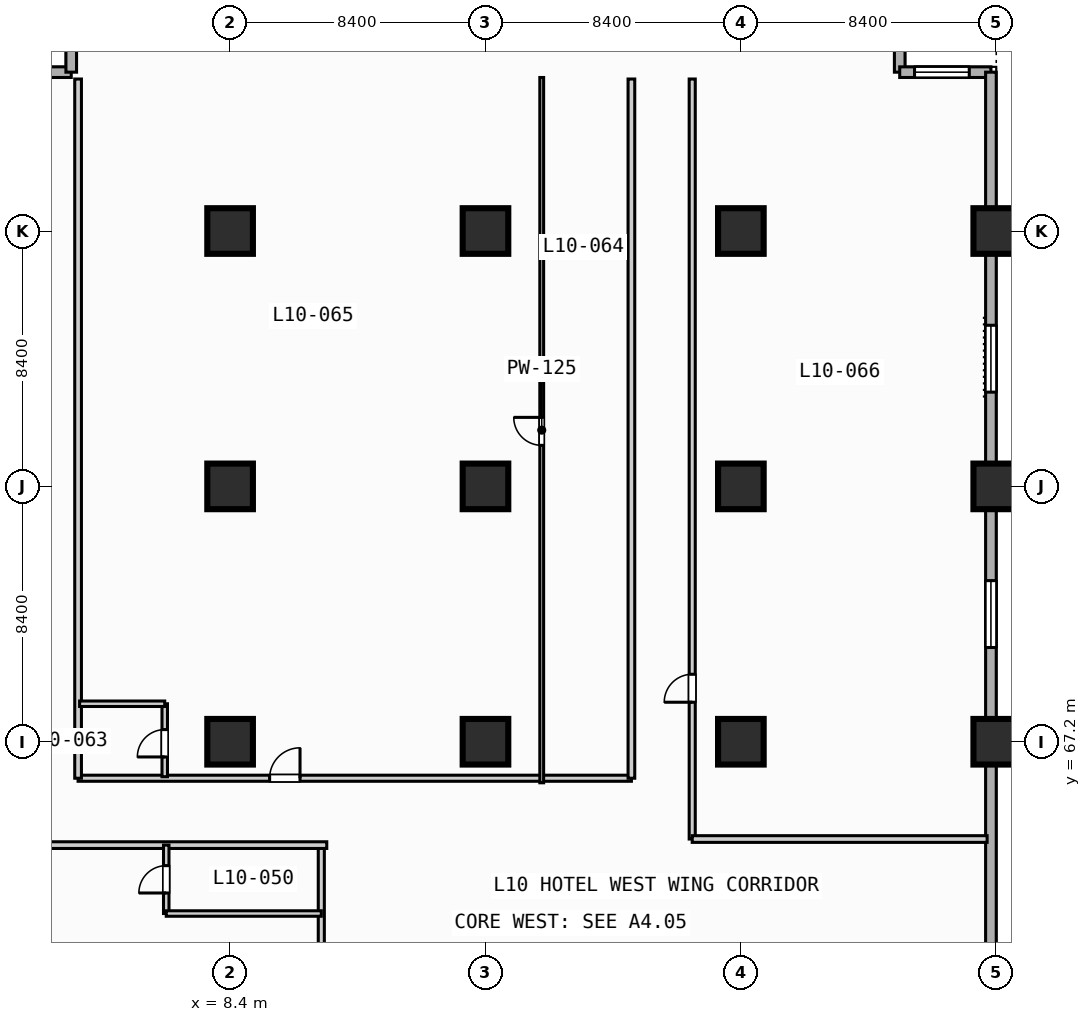
"""IFC4 building model, lengths in metres.
Left out: names, types, materials, properties, quantities, classifications, styles, units other than length and angle.
Written with IfcOpenShell. Run it as: python <this file> out.ifc"""

import sys

from ifc_helpers import new_model, si_unit, direction, frame, frame_2d, origin, origin_2d, place, context, subcontext, project, spatial, rectangle, extrude, element, fill, save


model = new_model("IFC4")
c1 = context("Model", 3, precision=1e-05, world=origin(), true_north=direction((0.0, 1.0)))
c2 = subcontext(c1, "Body", "Model", "MODEL_VIEW")
j1 = project(units=[si_unit("LENGTHUNIT", "METRE"), si_unit("PLANEANGLEUNIT", "RADIAN")], contexts=[c1])
p1 = place(None, origin())
s1 = spatial("IfcSite", under=j1, at=p1, CompositionType="ELEMENT")
p2 = place(p1, origin())
s2 = spatial("IfcBuilding", under=s1, at=p2, CompositionType="ELEMENT")
p3 = place(p2, frame((0.0, 0.0, 47.2)))
s3 = spatial("IfcBuildingStorey", under=s2, at=p3, CompositionType="ELEMENT", Elevation=47.2)
for number, where, z_axis, x_axis in (
    (1, (8.4, 67.2, 0.0), (0.0, 0.0, 1.0), (1.0, 0.0, 0.0)),
    (2, (8.4, 75.6, 0.0), (0.0, 0.0, 1.0), (1.0, 0.0, 0.0)),
    (3, (8.4, 84.0, 0.0), (0.0, 0.0, 1.0), (1.0, 0.0, 0.0)),
    (4, (16.8, 67.2, 0.0), (0.0, 0.0, 1.0), (1.0, 0.0, 0.0)),
    (5, (16.8, 75.6, 0.0), (0.0, 0.0, 1.0), (1.0, 0.0, 0.0)),
    (6, (16.8, 84.0, 0.0), (0.0, 0.0, 1.0), (1.0, 0.0, 0.0)),
    (7, (25.2, 67.2, 0.0), (0.0, 0.0, 1.0), (1.0, 0.0, 0.0)),
    (8, (25.2, 75.6, 0.0), (0.0, 0.0, 1.0), (1.0, 0.0, 0.0)),
    (9, (25.2, 84.0, 0.0), (0.0, 0.0, 1.0), (1.0, 0.0, 0.0)),
    (10, (33.6, 67.2, 0.0), (0.0, 0.0, 1.0), (1.0, 0.0, 0.0)),
    (11, (33.6, 75.6, 0.0), (0.0, 0.0, 1.0), (1.0, 0.0, 0.0)),
    (12, (33.6, 84.0, 0.0), (0.0, 0.0, 1.0), (1.0, 0.0, 0.0)),
):
    element("IfcColumn", number, at=place(p3, frame(where, z_axis=z_axis, x_axis=x_axis)), inside=s3, PredefinedType="COLUMN", context=c2, shape_type="SweptSolid", body=[
        extrude(rectangle(XDim=1.5, YDim=1.5, at=origin_2d()), origin(), (0.0, 0.0, 1.0), 3.8),
    ])
for number, where, z_axis, x_axis in (
    (13, (0.175, 89.225, 0.0), (0.0, 0.0, 1.0), (1.0, 0.0, 0.0)),
    (14, (3.175, 89.225, 0.0), (0.0, 0.0, 1.0), (0.0, 1.0, 0.0)),
    (15, (30.425, 92.225, 0.0), (0.0, 0.0, 1.0), (0.0, -1.0, 0.0)),
):
    element("IfcWall", number, at=place(p3, frame(where, z_axis=z_axis, x_axis=x_axis)), inside=s3, PredefinedType="STANDARD", context=c2, shape_type="SweptSolid", body=[
        extrude(rectangle(XDim=3.0, YDim=0.35, at=frame_2d((1.5, 0.0))), origin(), (0.0, 0.0, 1.0), 3.55),
    ])
p4 = place(p3, frame((30.425, 89.225, 0.0), z_axis=(0.0, 0.0, 1.0), x_axis=(1.0, 0.0, 0.0)))
e16 = element("IfcWall", 16, at=p4, inside=s3, PredefinedType="STANDARD", context=c2, shape_type="SweptSolid", body=[
    extrude(rectangle(XDim=3.0, YDim=0.35, at=frame_2d((1.5, 0.0))), origin(), (0.0, 0.0, 1.0), 3.55),
])
p5 = place(p4, frame((0.488, 0.0, 0.85)))
e17 = element("IfcOpeningElement", 17, at=p5, cuts=e16, PredefinedType="OPENING", context=c2, shape_type="SweptSolid", body=[
    extrude(rectangle(XDim=1.8, YDim=1.8, at=frame_2d((0.9, 0.9))), frame((0.0, 0.185, 0.0), z_axis=(0.0, -1.0, 0.0), x_axis=(1.0, 0.0, 0.0)), (0.0, 0.0, 1.0), 0.37),
])
p6 = place(p3, frame((33.425, 89.225, 0.0), z_axis=(0.0, 0.0, 1.0), x_axis=(0.0, -1.0, 0.0)))
e18 = element("IfcWall", 18, at=p6, inside=s3, PredefinedType="STANDARD", context=c2, shape_type="SweptSolid", body=[
    extrude(rectangle(XDim=55.8, YDim=0.35, at=frame_2d((27.9, 0.0))), origin(), (0.0, 0.0, 1.0), 3.55),
])
p7 = place(p6, frame((16.725, 0.0, 0.85)))
e19 = element("IfcOpeningElement", 19, at=p7, cuts=e18, PredefinedType="OPENING", context=c2, shape_type="SweptSolid", body=[
    extrude(rectangle(XDim=2.2, YDim=1.8, at=frame_2d((1.1, 0.9))), frame((0.0, 0.185, 0.0), z_axis=(0.0, -1.0, 0.0), x_axis=(1.0, 0.0, 0.0)), (0.0, 0.0, 1.0), 0.37),
])
p8 = place(p6, frame((8.325, 0.0, 0.85)))
e20 = element("IfcOpeningElement", 20, at=p8, cuts=e18, PredefinedType="OPENING", context=c2, shape_type="SweptSolid", body=[
    extrude(rectangle(XDim=2.2, YDim=1.8, at=frame_2d((1.1, 0.9))), frame((0.0, 0.185, 0.0), z_axis=(0.0, -1.0, 0.0), x_axis=(1.0, 0.0, 0.0)), (0.0, 0.0, 1.0), 0.37),
])
p9 = place(p3, frame((11.4, 3.4, 0.0), z_axis=(0.0, 0.0, 1.0), x_axis=(0.0, 1.0, 0.0)))
e21 = element("IfcWall", 21, at=p9, inside=s3, PredefinedType="PARTITIONING", context=c2, shape_type="SweptSolid", body=[
    extrude(rectangle(XDim=60.4, YDim=0.2, at=frame_2d((30.2, 0.0))), origin(), (0.0, 0.0, 1.0), 3.55),
])
p10 = place(p9, frame((6.065, 0.0, 0.0)))
e22 = element("IfcOpeningElement", 22, at=p10, cuts=e21, PredefinedType="OPENING", context=c2, shape_type="SweptSolid", body=[
    extrude(rectangle(XDim=1.0, YDim=2.15, at=frame_2d((0.5, 1.075))), frame((0.0, 0.11, 0.0), z_axis=(0.0, -1.0, 0.0), x_axis=(1.0, 0.0, 0.0)), (0.0, 0.0, 1.0), 0.22),
])
p11 = place(p9, frame((13.735, 0.0, 0.0)))
e23 = element("IfcOpeningElement", 23, at=p11, cuts=e21, PredefinedType="OPENING", context=c2, shape_type="SweptSolid", body=[
    extrude(rectangle(XDim=1.0, YDim=2.15, at=frame_2d((0.5, 1.075))), frame((0.0, 0.11, 0.0), z_axis=(0.0, -1.0, 0.0), x_axis=(1.0, 0.0, 0.0)), (0.0, 0.0, 1.0), 0.22),
])
p12 = place(p9, frame((22.96, 0.0, 0.0)))
e24 = element("IfcOpeningElement", 24, at=p12, cuts=e21, PredefinedType="OPENING", context=c2, shape_type="SweptSolid", body=[
    extrude(rectangle(XDim=1.0, YDim=2.15, at=frame_2d((0.5, 1.075))), frame((0.0, 0.11, 0.0), z_axis=(0.0, -1.0, 0.0), x_axis=(1.0, 0.0, 0.0)), (0.0, 0.0, 1.0), 0.22),
])
p13 = place(p9, frame((31.785, 0.0, 0.0)))
e25 = element("IfcOpeningElement", 25, at=p13, cuts=e21, PredefinedType="OPENING", context=c2, shape_type="SweptSolid", body=[
    extrude(rectangle(XDim=1.0, YDim=2.15, at=frame_2d((0.5, 1.075))), frame((0.0, 0.11, 0.0), z_axis=(0.0, -1.0, 0.0), x_axis=(1.0, 0.0, 0.0)), (0.0, 0.0, 1.0), 0.22),
])
p14 = place(p9, frame((42.56, 0.0, 0.0)))
e26 = element("IfcOpeningElement", 26, at=p14, cuts=e21, PredefinedType="OPENING", context=c2, shape_type="SweptSolid", body=[
    extrude(rectangle(XDim=1.0, YDim=2.15, at=frame_2d((0.5, 1.075))), frame((0.0, 0.11, 0.0), z_axis=(0.0, -1.0, 0.0), x_axis=(1.0, 0.0, 0.0)), (0.0, 0.0, 1.0), 0.22),
])
p15 = place(p9, frame((53.935, 0.0, 0.0)))
e27 = element("IfcOpeningElement", 27, at=p15, cuts=e21, PredefinedType="OPENING", context=c2, shape_type="SweptSolid", body=[
    extrude(rectangle(XDim=1.0, YDim=2.15, at=frame_2d((0.5, 1.075))), frame((0.0, 0.11, 0.0), z_axis=(0.0, -1.0, 0.0), x_axis=(1.0, 0.0, 0.0)), (0.0, 0.0, 1.0), 0.22),
])
p16 = place(p3, frame((0.2, 63.8, 0.0), z_axis=(0.0, 0.0, 1.0), x_axis=(1.0, 0.0, 0.0)))
e28 = element("IfcWall", 28, at=p16, inside=s3, PredefinedType="PARTITIONING", context=c2, shape_type="SweptSolid", body=[
    extrude(rectangle(XDim=11.38, YDim=0.22, at=frame_2d((5.69, 0.0))), origin(), (0.0, 0.0, 1.0), 3.55),
])
p17 = place(p3, frame((6.3, 61.55, 0.0), z_axis=(0.0, 0.0, 1.0), x_axis=(0.0, 1.0, 0.0)))
e29 = element("IfcWall", 29, at=p17, inside=s3, PredefinedType="PLUMBINGWALL", context=c2, shape_type="SweptSolid", body=[
    extrude(rectangle(XDim=2.25, YDim=0.18, at=frame_2d((1.125, 0.0))), origin(), (0.0, 0.0, 1.0), 3.55),
])
p18 = place(p17, frame((0.675, 0.0, 0.0)))
e30 = element("IfcOpeningElement", 30, at=p18, cuts=e29, PredefinedType="OPENING", context=c2, shape_type="SweptSolid", body=[
    extrude(rectangle(XDim=0.9, YDim=2.1, at=frame_2d((0.45, 1.05))), frame((0.0, 0.1, 0.0), z_axis=(0.0, -1.0, 0.0), x_axis=(1.0, 0.0, 0.0)), (0.0, 0.0, 1.0), 0.2),
])
p19 = place(p3, frame((6.3, 61.55, 0.0), z_axis=(0.0, 0.0, 1.0), x_axis=(1.0, 0.0, 0.0)))
e31 = element("IfcWall", 31, at=p19, inside=s3, PredefinedType="PLUMBINGWALL", context=c2, shape_type="SweptSolid", body=[
    extrude(rectangle(XDim=5.1, YDim=0.18, at=frame_2d((2.55, 0.0))), origin(), (0.0, 0.0, 1.0), 3.55),
])
p20 = place(p3, frame((3.4, 66.0, 0.0), z_axis=(0.0, 0.0, 1.0), x_axis=(1.0, 0.0, 0.0)))
e32 = element("IfcWall", 32, at=p20, inside=s3, PredefinedType="PARTITIONING", context=c2, shape_type="SweptSolid", body=[
    extrude(rectangle(XDim=18.2, YDim=0.2, at=frame_2d((9.1, 0.0))), origin(), (0.0, 0.0, 1.0), 3.55),
])
p21 = place(p20, frame((6.3, 0.0, 0.0)))
e33 = element("IfcOpeningElement", 33, at=p21, cuts=e32, PredefinedType="OPENING", context=c2, shape_type="SweptSolid", body=[
    extrude(rectangle(XDim=1.0, YDim=2.15, at=frame_2d((0.5, 1.075))), frame((0.0, 0.11, 0.0), z_axis=(0.0, -1.0, 0.0), x_axis=(1.0, 0.0, 0.0)), (0.0, 0.0, 1.0), 0.22),
])
for number, where, z_axis, x_axis in (
    (34, (21.6, 66.0, 0.0), (0.0, 0.0, 1.0), (0.0, 1.0, 0.0)),
    (35, (3.4, 66.0, 0.0), (0.0, 0.0, 1.0), (0.0, 1.0, 0.0)),
):
    element("IfcWall", number, at=place(p3, frame(where, z_axis=z_axis, x_axis=x_axis)), inside=s3, PredefinedType="PARTITIONING", context=c2, shape_type="SweptSolid", body=[
        extrude(rectangle(XDim=23.0, YDim=0.22, at=frame_2d((11.5, 0.0))), origin(), (0.0, 0.0, 1.0), 3.55),
    ])
p22 = place(p3, frame((6.25, 66.05, 0.0), z_axis=(0.0, 0.0, 1.0), x_axis=(0.0, 1.0, 0.0)))
e36 = element("IfcWall", 36, at=p22, inside=s3, PredefinedType="PLUMBINGWALL", context=c2, shape_type="SweptSolid", body=[
    extrude(rectangle(XDim=2.4, YDim=0.18, at=frame_2d((1.2, 0.0))), origin(), (0.0, 0.0, 1.0), 3.55),
])
p23 = place(p22, frame((0.65, 0.0, 0.0)))
e37 = element("IfcOpeningElement", 37, at=p23, cuts=e36, PredefinedType="OPENING", context=c2, shape_type="SweptSolid", body=[
    extrude(rectangle(XDim=0.9, YDim=2.1, at=frame_2d((0.45, 1.05))), frame((0.0, 0.1, 0.0), z_axis=(0.0, -1.0, 0.0), x_axis=(1.0, 0.0, 0.0)), (0.0, 0.0, 1.0), 0.2),
])
p24 = place(p3, frame((3.45, 68.45, 0.0), z_axis=(0.0, 0.0, 1.0), x_axis=(1.0, 0.0, 0.0)))
e38 = element("IfcWall", 38, at=p24, inside=s3, PredefinedType="PLUMBINGWALL", context=c2, shape_type="SweptSolid", body=[
    extrude(rectangle(XDim=2.8, YDim=0.18, at=frame_2d((1.4, 0.0))), origin(), (0.0, 0.0, 1.0), 3.55),
])
p25 = place(p3, frame((18.65, 65.85, 0.0), z_axis=(0.0, 0.0, 1.0), x_axis=(0.0, 1.0, 0.0)))
e39 = element("IfcWall", 39, at=p25, inside=s3, PredefinedType="PARTITIONING", context=c2, shape_type="SweptSolid", body=[
    extrude(rectangle(XDim=23.2, YDim=0.125, at=frame_2d((11.6, 0.0))), origin(), (0.0, 0.0, 1.0), 3.55),
])
p26 = place(p25, frame((11.1, 0.0, 0.0)))
e40 = element("IfcOpeningElement", 40, at=p26, cuts=e39, PredefinedType="OPENING", context=c2, shape_type="SweptSolid", body=[
    extrude(rectangle(XDim=0.92, YDim=2.1, at=frame_2d((0.46, 1.05))), frame((0.0, 0.073, 0.0), z_axis=(0.0, -1.0, 0.0), x_axis=(1.0, 0.0, 0.0)), (0.0, 0.0, 1.0), 0.145),
])
p27 = place(p3, frame((23.6, 64.0, 0.0), z_axis=(0.0, 0.0, 1.0), x_axis=(0.0, 1.0, 0.0)))
e41 = element("IfcWall", 41, at=p27, inside=s3, PredefinedType="PARTITIONING", context=c2, shape_type="SweptSolid", body=[
    extrude(rectangle(XDim=25.0, YDim=0.2, at=frame_2d((12.5, 0.0))), origin(), (0.0, 0.0, 1.0), 3.55),
])
p28 = place(p27, frame((4.5, 0.0, 0.0)))
e42 = element("IfcOpeningElement", 42, at=p28, cuts=e41, PredefinedType="OPENING", context=c2, shape_type="SweptSolid", body=[
    extrude(rectangle(XDim=0.92, YDim=2.1, at=frame_2d((0.46, 1.05))), frame((0.0, 0.11, 0.0), z_axis=(0.0, -1.0, 0.0), x_axis=(1.0, 0.0, 0.0)), (0.0, 0.0, 1.0), 0.22),
])
p29 = place(p3, frame((23.6, 64.0, 0.0), z_axis=(0.0, 0.0, 1.0), x_axis=(1.0, 0.0, 0.0)))
e43 = element("IfcWall", 43, at=p29, inside=s3, PredefinedType="PARTITIONING", context=c2, shape_type="SweptSolid", body=[
    extrude(rectangle(XDim=9.7, YDim=0.22, at=frame_2d((4.85, 0.0))), origin(), (0.0, 0.0, 1.0), 3.55),
])
p30 = place(p5, origin())
e44 = element("IfcWindow", 44, at=p30, inside=s3, PartitioningType="SINGLE_PANEL", PredefinedType="WINDOW", context=c2, shape_type="SweptSolid", body=[
    extrude(rectangle(XDim=1.8, YDim=1.8, at=frame_2d((0.9, 0.9))), frame((0.0, 0.03, 0.0), z_axis=(0.0, -1.0, 0.0), x_axis=(1.0, 0.0, 0.0)), (0.0, 0.0, 1.0), 0.06),
])
fill(e17, e44)
p31 = place(p7, origin())
e45 = element("IfcWindow", 45, at=p31, inside=s3, PartitioningType="SINGLE_PANEL", PredefinedType="WINDOW", context=c2, shape_type="SweptSolid", body=[
    extrude(rectangle(XDim=2.2, YDim=1.8, at=frame_2d((1.1, 0.9))), frame((0.0, 0.03, 0.0), z_axis=(0.0, -1.0, 0.0), x_axis=(1.0, 0.0, 0.0)), (0.0, 0.0, 1.0), 0.06),
])
fill(e19, e45)
p32 = place(p8, origin())
e46 = element("IfcWindow", 46, at=p32, inside=s3, PartitioningType="SINGLE_PANEL", PredefinedType="WINDOW", context=c2, shape_type="SweptSolid", body=[
    extrude(rectangle(XDim=2.2, YDim=1.8, at=frame_2d((1.1, 0.9))), frame((0.0, 0.03, 0.0), z_axis=(0.0, -1.0, 0.0), x_axis=(1.0, 0.0, 0.0)), (0.0, 0.0, 1.0), 0.06),
])
fill(e20, e46)
p33 = place(p18, origin())
e47 = element("IfcDoor", 47, at=p33, inside=s3, OperationType="SINGLE_SWING_LEFT", PredefinedType="DOOR", context=c2, shape_type="SweptSolid", body=[
    extrude(rectangle(XDim=0.9, YDim=2.1, at=frame_2d((0.45, 1.05))), frame((0.0, 0.025, 0.0), z_axis=(0.0, -1.0, 0.0), x_axis=(1.0, 0.0, 0.0)), (0.0, 0.0, 1.0), 0.05),
])
fill(e30, e47)
p34 = place(p21, origin())
e48 = element("IfcDoor", 48, at=p34, inside=s3, OperationType="SINGLE_SWING_RIGHT", PredefinedType="DOOR", context=c2, shape_type="SweptSolid", body=[
    extrude(rectangle(XDim=1.0, YDim=2.15, at=frame_2d((0.5, 1.075))), frame((0.0, 0.025, 0.0), z_axis=(0.0, -1.0, 0.0), x_axis=(1.0, 0.0, 0.0)), (0.0, 0.0, 1.0), 0.05),
])
fill(e33, e48)
p35 = place(p23, origin())
e49 = element("IfcDoor", 49, at=p35, inside=s3, OperationType="SINGLE_SWING_LEFT", PredefinedType="DOOR", context=c2, shape_type="SweptSolid", body=[
    extrude(rectangle(XDim=0.9, YDim=2.1, at=frame_2d((0.45, 1.05))), frame((0.0, 0.025, 0.0), z_axis=(0.0, -1.0, 0.0), x_axis=(1.0, 0.0, 0.0)), (0.0, 0.0, 1.0), 0.05),
])
fill(e37, e49)
p36 = place(p26, origin())
e50 = element("IfcDoor", 50, at=p36, inside=s3, OperationType="SINGLE_SWING_RIGHT", PredefinedType="DOOR", context=c2, shape_type="SweptSolid", body=[
    extrude(rectangle(XDim=0.92, YDim=2.1, at=frame_2d((0.46, 1.05))), frame((0.0, 0.025, 0.0), z_axis=(0.0, -1.0, 0.0), x_axis=(1.0, 0.0, 0.0)), (0.0, 0.0, 1.0), 0.05),
])
fill(e40, e50)
p37 = place(p28, origin())
e51 = element("IfcDoor", 51, at=p37, inside=s3, OperationType="SINGLE_SWING_LEFT", PredefinedType="DOOR", context=c2, shape_type="SweptSolid", body=[
    extrude(rectangle(XDim=0.92, YDim=2.1, at=frame_2d((0.46, 1.05))), frame((0.0, 0.025, 0.0), z_axis=(0.0, -1.0, 0.0), x_axis=(1.0, 0.0, 0.0)), (0.0, 0.0, 1.0), 0.05),
])
fill(e42, e51)
save(model, sys.argv[1])
